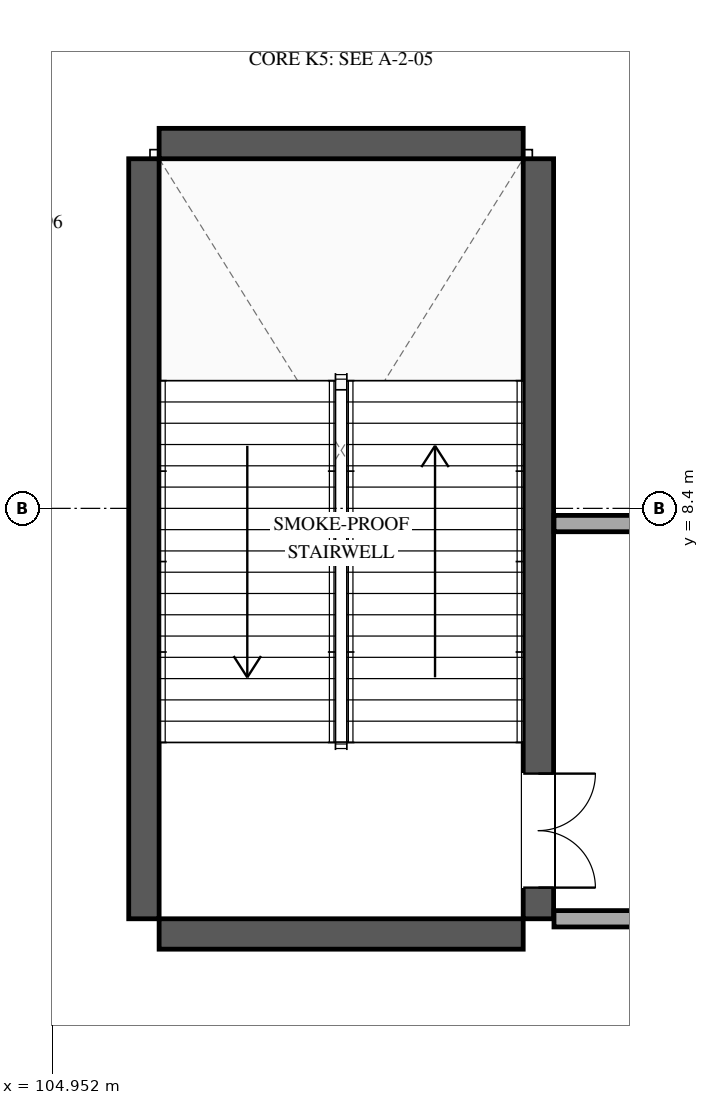
"""IFC4 building model, lengths in metres.
Left out: names, types, materials, properties, quantities, classifications, styles, units other than length and angle.
Written with IfcOpenShell. Run it as: python <this file> out.ifc"""

import sys

from ifc_helpers import new_model, si_unit, direction, frame, frame_2d, origin, place, context, subcontext, project, spatial, rectangle, extrude, element, fill, save


model = new_model("IFC4")
c1 = context("Model", 3, precision=1e-05, world=origin(), true_north=direction((0.0, 1.0)))
c2 = subcontext(c1, "Body", "Model", "MODEL_VIEW")
j1 = project(units=[si_unit("LENGTHUNIT", "METRE"), si_unit("PLANEANGLEUNIT", "RADIAN")], contexts=[c1])
p1 = place(None, origin())
s1 = spatial("IfcSite", under=j1, at=p1, CompositionType="ELEMENT")
p2 = place(p1, origin())
s2 = spatial("IfcBuilding", under=s1, at=p2, CompositionType="ELEMENT")
p3 = place(p2, frame((0.0, 0.0, 6.0)))
s3 = spatial("IfcBuildingStorey", under=s2, at=p3, CompositionType="ELEMENT", Elevation=6.0)
p4 = place(p3, frame((106.155, 3.0, 0.0), z_axis=(0.0, 0.0, 1.0), x_axis=(0.0, 1.0, 0.0)))
e1 = element("IfcWall", 1, at=p4, inside=s3, PredefinedType="SHEAR", context=c2, shape_type="SweptSolid", body=[
    extrude(rectangle(XDim=10.0, YDim=0.4, at=frame_2d((5.0, 0.0))), origin(), (0.0, 0.0, 1.0), 5.4),
])
p5 = place(p3, frame((111.345, 13.0, 0.0), z_axis=(0.0, 0.0, 1.0), x_axis=(0.0, -1.0, 0.0)))
e2 = element("IfcWall", 2, at=p5, inside=s3, PredefinedType="SHEAR", context=c2, shape_type="SweptSolid", body=[
    extrude(rectangle(XDim=10.0, YDim=0.4, at=frame_2d((5.0, 0.0))), origin(), (0.0, 0.0, 1.0), 5.4),
])
p6 = place(p5, frame((8.09, 0.0, 0.0)))
e3 = element("IfcOpeningElement", 3, at=p6, cuts=e2, PredefinedType="OPENING", context=c2, shape_type="SweptSolid", body=[
    extrude(rectangle(XDim=1.5, YDim=2.2, at=frame_2d((0.75, 1.1))), frame((0.0, 0.21, 0.0), z_axis=(0.0, -1.0, 0.0), x_axis=(1.0, 0.0, 0.0)), (0.0, 0.0, 1.0), 0.42),
])
for number, where, z_axis, x_axis in (
    (4, (111.145, 2.8, 0.0), (0.0, 0.0, 1.0), (-1.0, 0.0, 0.0)),
    (5, (106.355, 13.2, 0.0), (0.0, 0.0, 1.0), (1.0, 0.0, 0.0)),
):
    element("IfcWall", number, at=place(p3, frame(where, z_axis=z_axis, x_axis=x_axis)), inside=s3, PredefinedType="SHEAR", context=c2, shape_type="SweptSolid", body=[
        extrude(rectangle(XDim=4.79, YDim=0.4, at=frame_2d((2.395, 0.0))), origin(), (0.0, 0.0, 1.0), 5.4),
    ])
p7 = place(p3, frame((111.55, 8.2, 0.0), z_axis=(0.0, 0.0, 1.0), x_axis=(1.0, 0.0, 0.0)))
e6 = element("IfcWall", 6, at=p7, inside=s3, PredefinedType="PARTITIONING", context=c2, shape_type="SweptSolid", body=[
    extrude(rectangle(XDim=1.09, YDim=0.215, at=frame_2d((0.545, 0.0))), origin(), (0.0, 0.0, 1.0), 5.06),
])
p8 = place(p3, frame((117.6, 3.0, 0.0), z_axis=(0.0, 0.0, 1.0), x_axis=(-1.0, 0.0, 0.0)))
e7 = element("IfcWall", 7, at=p8, inside=s3, PredefinedType="PARTITIONING", context=c2, shape_type="SweptSolid", body=[
    extrude(rectangle(XDim=6.05, YDim=0.215, at=frame_2d((3.025, 0.0))), origin(), (0.0, 0.0, 1.0), 4.31),
])
p9 = place(p6, origin())
e8 = element("IfcDoor", 8, at=p9, inside=s3, OperationType="DOUBLE_DOOR_SINGLE_SWING", PredefinedType="DOOR", context=c2, shape_type="SweptSolid", body=[
    extrude(rectangle(XDim=1.5, YDim=2.2, at=frame_2d((0.75, 1.1))), frame((0.0, 0.025, 0.0), z_axis=(0.0, -1.0, 0.0), x_axis=(1.0, 0.0, 0.0)), (0.0, 0.0, 1.0), 0.05),
])
fill(e3, e8)
save(model, sys.argv[1])
